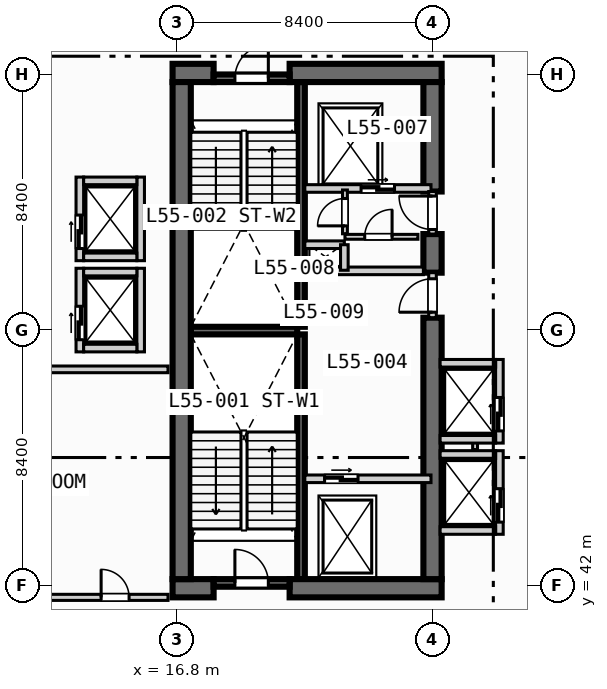
"""IFC4 building model, lengths in metres.
Left out: names, types, materials, properties, quantities, classifications, styles, units other than length and angle.
Written with IfcOpenShell. Run it as: python <this file> out.ifc"""

import sys

from ifc_helpers import new_model, si_unit, direction, frame, frame_2d, origin, place, context, subcontext, project, spatial, rectangle, extrude, element, fill, save


model = new_model("IFC4")
c1 = context("Model", 3, precision=1e-05, world=origin(), true_north=direction((0.0, 1.0)))
c2 = subcontext(c1, "Body", "Model", "MODEL_VIEW")
j1 = project(units=[si_unit("LENGTHUNIT", "METRE"), si_unit("PLANEANGLEUNIT", "RADIAN")], contexts=[c1])
p1 = place(None, origin())
s1 = spatial("IfcSite", under=j1, at=p1, CompositionType="ELEMENT")
p2 = place(p1, origin())
s2 = spatial("IfcBuilding", under=s1, at=p2, CompositionType="ELEMENT")
p3 = place(p2, frame((0.0, 0.0, 224.0)))
s3 = spatial("IfcBuildingStorey", under=s2, at=p3, CompositionType="ELEMENT", Elevation=224.0)
for number, where, z_axis, x_axis in (
    (1, (20.875, 42.2, 0.0), (0.0, 0.0, 1.0), (0.0, 1.0, 0.0)),
    (2, (20.875, 50.5, 0.0), (0.0, 0.0, 1.0), (0.0, 1.0, 0.0)),
):
    element("IfcWall", number, at=place(p3, frame(where, z_axis=z_axis, x_axis=x_axis)), inside=s3, PredefinedType="SOLIDWALL", context=c2, shape_type="SweptSolid", body=[
        extrude(rectangle(XDim=8.05, YDim=0.25, at=frame_2d((4.025, 0.0))), origin(), (0.0, 0.0, 1.0), 3.75),
    ])
p4 = place(p3, frame((17.25, 50.375, 0.0), z_axis=(0.0, 0.0, 1.0), x_axis=(1.0, 0.0, 0.0)))
e3 = element("IfcWall", 3, at=p4, inside=s3, PredefinedType="SOLIDWALL", context=c2, shape_type="SweptSolid", body=[
    extrude(rectangle(XDim=3.5, YDim=0.25, at=frame_2d((1.75, 0.0))), origin(), (0.0, 0.0, 1.0), 3.75),
])
p5 = place(p3, frame((16.65, 41.9, 0.0), z_axis=(0.0, 0.0, 1.0), x_axis=(1.0, 0.0, 0.0)))
e4 = element("IfcWall", 4, at=p5, inside=s3, PredefinedType="SHEAR", context=c2, shape_type="SweptSolid", body=[
    extrude(rectangle(XDim=1.35, YDim=0.6, at=frame_2d((0.675, 0.0))), origin(), (0.0, 0.0, 1.0), 3.75),
])
p6 = place(p3, frame((20.5, 41.9, 0.0), z_axis=(0.0, 0.0, 1.0), x_axis=(1.0, 0.0, 0.0)))
e5 = element("IfcWall", 5, at=p6, inside=s3, PredefinedType="SHEAR", context=c2, shape_type="SweptSolid", body=[
    extrude(rectangle(XDim=5.0, YDim=0.6, at=frame_2d((2.5, 0.0))), origin(), (0.0, 0.0, 1.0), 3.75),
])
p7 = place(p3, frame((16.65, 58.85, 0.0), z_axis=(0.0, 0.0, 1.0), x_axis=(1.0, 0.0, 0.0)))
e6 = element("IfcWall", 6, at=p7, inside=s3, PredefinedType="SHEAR", context=c2, shape_type="SweptSolid", body=[
    extrude(rectangle(XDim=1.35, YDim=0.6, at=frame_2d((0.675, 0.0))), origin(), (0.0, 0.0, 1.0), 3.75),
])
p8 = place(p3, frame((20.5, 58.85, 0.0), z_axis=(0.0, 0.0, 1.0), x_axis=(1.0, 0.0, 0.0)))
e7 = element("IfcWall", 7, at=p8, inside=s3, PredefinedType="SHEAR", context=c2, shape_type="SweptSolid", body=[
    extrude(rectangle(XDim=5.0, YDim=0.6, at=frame_2d((2.5, 0.0))), origin(), (0.0, 0.0, 1.0), 3.75),
])
p9 = place(p3, frame((16.95, 42.2, 0.0), z_axis=(0.0, 0.0, 1.0), x_axis=(0.0, 1.0, 0.0)))
e8 = element("IfcWall", 8, at=p9, inside=s3, PredefinedType="SHEAR", context=c2, shape_type="SweptSolid", body=[
    extrude(rectangle(XDim=16.35, YDim=0.6, at=frame_2d((8.175, 0.0))), origin(), (0.0, 0.0, 1.0), 3.75),
])
p10 = place(p3, frame((25.2, 42.2, 0.0), z_axis=(0.0, 0.0, 1.0), x_axis=(0.0, 1.0, 0.0)))
e9 = element("IfcWall", 9, at=p10, inside=s3, PredefinedType="SHEAR", context=c2, shape_type="SweptSolid", body=[
    extrude(rectangle(XDim=8.6, YDim=0.6, at=frame_2d((4.3, 0.0))), origin(), (0.0, 0.0, 1.0), 3.75),
])
p11 = place(p3, frame((25.2, 52.28, 0.0), z_axis=(0.0, 0.0, 1.0), x_axis=(0.0, 1.0, 0.0)))
e10 = element("IfcWall", 10, at=p11, inside=s3, PredefinedType="SHEAR", context=c2, shape_type="SweptSolid", body=[
    extrude(rectangle(XDim=1.27, YDim=0.6, at=frame_2d((0.635, 0.0))), origin(), (0.0, 0.0, 1.0), 3.75),
])
p12 = place(p3, frame((25.2, 54.95, 0.0), z_axis=(0.0, 0.0, 1.0), x_axis=(0.0, 1.0, 0.0)))
e11 = element("IfcWall", 11, at=p12, inside=s3, PredefinedType="SHEAR", context=c2, shape_type="SweptSolid", body=[
    extrude(rectangle(XDim=3.6, YDim=0.6, at=frame_2d((1.8, 0.0))), origin(), (0.0, 0.0, 1.0), 3.75),
])
p13 = place(p3, frame((18.0, 42.075, 0.0), z_axis=(0.0, 0.0, 1.0), x_axis=(1.0, 0.0, 0.0)))
e12 = element("IfcWall", 12, at=p13, inside=s3, PredefinedType="SOLIDWALL", context=c2, shape_type="SweptSolid", body=[
    extrude(rectangle(XDim=2.5, YDim=0.25, at=frame_2d((1.25, 0.0))), origin(), (0.0, 0.0, 1.0), 3.75),
])
p14 = place(p13, frame((0.7, 0.0, 0.0)))
e13 = element("IfcOpeningElement", 13, at=p14, cuts=e12, PredefinedType="OPENING", context=c2, shape_type="SweptSolid", body=[
    extrude(rectangle(XDim=1.1, YDim=2.15, at=frame_2d((0.55, 1.075))), frame((0.0, 0.135, 0.0), z_axis=(0.0, -1.0, 0.0), x_axis=(1.0, 0.0, 0.0)), (0.0, 0.0, 1.0), 0.27),
])
p15 = place(p3, frame((18.0, 58.675, 0.0), z_axis=(0.0, 0.0, 1.0), x_axis=(1.0, 0.0, 0.0)))
e14 = element("IfcWall", 14, at=p15, inside=s3, PredefinedType="SOLIDWALL", context=c2, shape_type="SweptSolid", body=[
    extrude(rectangle(XDim=2.5, YDim=0.25, at=frame_2d((1.25, 0.0))), origin(), (0.0, 0.0, 1.0), 3.75),
])
p16 = place(p15, frame((0.7, 0.0, 0.0)))
e15 = element("IfcOpeningElement", 15, at=p16, cuts=e14, PredefinedType="OPENING", context=c2, shape_type="SweptSolid", body=[
    extrude(rectangle(XDim=1.1, YDim=2.15, at=frame_2d((0.55, 1.075))), frame((0.0, 0.135, 0.0), z_axis=(0.0, -1.0, 0.0), x_axis=(1.0, 0.0, 0.0)), (0.0, 0.0, 1.0), 0.27),
])
p17 = place(p3, frame((21.0, 45.5, 0.0), z_axis=(0.0, 0.0, 1.0), x_axis=(1.0, 0.0, 0.0)))
e16 = element("IfcWall", 16, at=p17, inside=s3, PredefinedType="SOLIDWALL", context=c2, shape_type="SweptSolid", body=[
    extrude(rectangle(XDim=4.15, YDim=0.25, at=frame_2d((2.075, 0.0))), origin(), (0.0, 0.0, 1.0), 3.75),
])
p18 = place(p17, frame((0.65, 0.0, 0.0)))
e17 = element("IfcOpeningElement", 17, at=p18, cuts=e16, PredefinedType="OPENING", context=c2, shape_type="SweptSolid", body=[
    extrude(rectangle(XDim=1.1, YDim=2.15, at=frame_2d((0.55, 1.075))), frame((0.0, 0.135, 0.0), z_axis=(0.0, -1.0, 0.0), x_axis=(1.0, 0.0, 0.0)), (0.0, 0.0, 1.0), 0.27),
])
p19 = place(p3, frame((25.2, 50.8, 0.0), z_axis=(0.0, 0.0, 1.0), x_axis=(0.0, 1.0, 0.0)))
e18 = element("IfcWall", 18, at=p19, inside=s3, PredefinedType="SOLIDWALL", context=c2, shape_type="SweptSolid", body=[
    extrude(rectangle(XDim=1.48, YDim=0.25, at=frame_2d((0.74, 0.0))), origin(), (0.0, 0.0, 1.0), 3.75),
])
p20 = place(p19, frame((0.18, 0.0, 0.0)))
e19 = element("IfcOpeningElement", 19, at=p20, cuts=e18, PredefinedType="OPENING", context=c2, shape_type="SweptSolid", body=[
    extrude(rectangle(XDim=1.1, YDim=2.15, at=frame_2d((0.55, 1.075))), frame((0.0, 0.135, 0.0), z_axis=(0.0, -1.0, 0.0), x_axis=(1.0, 0.0, 0.0)), (0.0, 0.0, 1.0), 0.27),
])
p21 = place(p3, frame((21.0, 52.34, 0.0), z_axis=(0.0, 0.0, 1.0), x_axis=(1.0, 0.0, 0.0)))
e20 = element("IfcWall", 20, at=p21, inside=s3, PredefinedType="SOLIDWALL", context=c2, shape_type="SweptSolid", body=[
    extrude(rectangle(XDim=3.9, YDim=0.25, at=frame_2d((1.95, 0.0))), origin(), (0.0, 0.0, 1.0), 3.75),
])
p22 = place(p3, frame((21.0, 55.05, 0.0), z_axis=(0.0, 0.0, 1.0), x_axis=(1.0, 0.0, 0.0)))
e21 = element("IfcWall", 21, at=p22, inside=s3, PredefinedType="SOLIDWALL", context=c2, shape_type="SweptSolid", body=[
    extrude(rectangle(XDim=4.15, YDim=0.25, at=frame_2d((2.075, 0.0))), origin(), (0.0, 0.0, 1.0), 3.75),
])
p23 = place(p22, frame((1.85, 0.0, 0.0)))
e22 = element("IfcOpeningElement", 22, at=p23, cuts=e21, PredefinedType="OPENING", context=c2, shape_type="SweptSolid", body=[
    extrude(rectangle(XDim=1.1, YDim=2.15, at=frame_2d((0.55, 1.075))), frame((0.0, 0.135, 0.0), z_axis=(0.0, -1.0, 0.0), x_axis=(1.0, 0.0, 0.0)), (0.0, 0.0, 1.0), 0.27),
])
p24 = place(p3, frame((25.2, 53.55, 0.0), z_axis=(0.0, 0.0, 1.0), x_axis=(0.0, 1.0, 0.0)))
e23 = element("IfcWall", 23, at=p24, inside=s3, PredefinedType="SOLIDWALL", context=c2, shape_type="SweptSolid", body=[
    extrude(rectangle(XDim=1.4, YDim=0.25, at=frame_2d((0.7, 0.0))), origin(), (0.0, 0.0, 1.0), 3.75),
])
p25 = place(p24, frame((0.15, 0.0, 0.0)))
e24 = element("IfcOpeningElement", 24, at=p25, cuts=e23, PredefinedType="OPENING", context=c2, shape_type="SweptSolid", body=[
    extrude(rectangle(XDim=1.1, YDim=2.15, at=frame_2d((0.55, 1.075))), frame((0.0, 0.135, 0.0), z_axis=(0.0, -1.0, 0.0), x_axis=(1.0, 0.0, 0.0)), (0.0, 0.0, 1.0), 0.27),
])
p26 = place(p3, frame((21.0, 53.2, 0.0), z_axis=(0.0, 0.0, 1.0), x_axis=(1.0, 0.0, 0.0)))
e25 = element("IfcWall", 25, at=p26, inside=s3, PredefinedType="SOLIDWALL", context=c2, shape_type="SweptSolid", body=[
    extrude(rectangle(XDim=1.3, YDim=0.25, at=frame_2d((0.65, 0.0))), origin(), (0.0, 0.0, 1.0), 3.75),
])
p27 = place(p3, frame((22.3, 52.36, 0.0), z_axis=(0.0, 0.0, 1.0), x_axis=(0.0, 1.0, 0.0)))
e26 = element("IfcWall", 26, at=p27, inside=s3, PredefinedType="SOLIDWALL", context=c2, shape_type="SweptSolid", body=[
    extrude(rectangle(XDim=0.84, YDim=0.25, at=frame_2d((0.42, 0.0))), origin(), (0.0, 0.0, 1.0), 3.75),
])
p28 = place(p3, frame((22.32, 53.56, 0.0), z_axis=(0.0, 0.0, 1.0), x_axis=(0.0, 1.0, 0.0)))
e27 = element("IfcWall", 27, at=p28, inside=s3, PredefinedType="PARTITIONING", context=c2, shape_type="SweptSolid", body=[
    extrude(rectangle(XDim=1.44, YDim=0.16, at=frame_2d((0.72, 0.0))), origin(), (0.0, 0.0, 1.0), 3.75),
])
p29 = place(p28, frame((0.26, 0.0, 0.0)))
e28 = element("IfcOpeningElement", 28, at=p29, cuts=e27, PredefinedType="OPENING", context=c2, shape_type="SweptSolid", body=[
    extrude(rectangle(XDim=0.9, YDim=2.1, at=frame_2d((0.45, 1.05))), frame((0.0, 0.09, 0.0), z_axis=(0.0, -1.0, 0.0), x_axis=(1.0, 0.0, 0.0)), (0.0, 0.0, 1.0), 0.18),
])
p30 = place(p3, frame((22.32, 53.46, 0.0), z_axis=(0.0, 0.0, 1.0), x_axis=(1.0, 0.0, 0.0)))
e29 = element("IfcWall", 29, at=p30, inside=s3, PredefinedType="PARTITIONING", context=c2, shape_type="SweptSolid", body=[
    extrude(rectangle(XDim=2.4, YDim=0.16, at=frame_2d((1.2, 0.0))), origin(), (0.0, 0.0, 1.0), 3.75),
])
p31 = place(p30, frame((0.65, 0.0, 0.0)))
e30 = element("IfcOpeningElement", 30, at=p31, cuts=e29, PredefinedType="OPENING", context=c2, shape_type="SweptSolid", body=[
    extrude(rectangle(XDim=0.9, YDim=2.1, at=frame_2d((0.45, 1.05))), frame((0.0, 0.09, 0.0), z_axis=(0.0, -1.0, 0.0), x_axis=(1.0, 0.0, 0.0)), (0.0, 0.0, 1.0), 0.18),
])
p32 = place(p3, frame((13.6, 49.675, 0.0), z_axis=(0.0, 0.0, 1.0), x_axis=(0.0, 1.0, 0.0)))
e31 = element("IfcWall", 31, at=p32, inside=s3, PredefinedType="SOLIDWALL", context=c2, shape_type="SweptSolid", body=[
    extrude(rectangle(XDim=2.75, YDim=0.25, at=frame_2d((1.375, 0.0))), origin(), (0.0, 0.0, 1.0), 3.75),
])
p33 = place(p32, frame((0.4, 0.0, 0.0)))
e32 = element("IfcOpeningElement", 32, at=p33, cuts=e31, PredefinedType="OPENING", context=c2, shape_type="SweptSolid", body=[
    extrude(rectangle(XDim=1.1, YDim=2.15, at=frame_2d((0.55, 1.075))), frame((0.0, 0.135, 0.0), z_axis=(0.0, -1.0, 0.0), x_axis=(1.0, 0.0, 0.0)), (0.0, 0.0, 1.0), 0.27),
])
p34 = place(p3, frame((15.6, 49.675, 0.0), z_axis=(0.0, 0.0, 1.0), x_axis=(0.0, 1.0, 0.0)))
e33 = element("IfcWall", 33, at=p34, inside=s3, PredefinedType="SOLIDWALL", context=c2, shape_type="SweptSolid", body=[
    extrude(rectangle(XDim=2.75, YDim=0.25, at=frame_2d((1.375, 0.0))), origin(), (0.0, 0.0, 1.0), 3.75),
])
for number, where, z_axis, x_axis in (
    (34, (13.725, 49.8, 0.0), (0.0, 0.0, 1.0), (1.0, 0.0, 0.0)),
    (35, (13.725, 52.3, 0.0), (0.0, 0.0, 1.0), (1.0, 0.0, 0.0)),
):
    element("IfcWall", number, at=place(p3, frame(where, z_axis=z_axis, x_axis=x_axis)), inside=s3, PredefinedType="SOLIDWALL", context=c2, shape_type="SweptSolid", body=[
        extrude(rectangle(XDim=1.75, YDim=0.25, at=frame_2d((0.875, 0.0))), origin(), (0.0, 0.0, 1.0), 3.75),
    ])
p35 = place(p3, frame((13.6, 52.675, 0.0), z_axis=(0.0, 0.0, 1.0), x_axis=(0.0, 1.0, 0.0)))
e36 = element("IfcWall", 36, at=p35, inside=s3, PredefinedType="SOLIDWALL", context=c2, shape_type="SweptSolid", body=[
    extrude(rectangle(XDim=2.75, YDim=0.25, at=frame_2d((1.375, 0.0))), origin(), (0.0, 0.0, 1.0), 3.75),
])
p36 = place(p35, frame((0.4, 0.0, 0.0)))
e37 = element("IfcOpeningElement", 37, at=p36, cuts=e36, PredefinedType="OPENING", context=c2, shape_type="SweptSolid", body=[
    extrude(rectangle(XDim=1.1, YDim=2.15, at=frame_2d((0.55, 1.075))), frame((0.0, 0.135, 0.0), z_axis=(0.0, -1.0, 0.0), x_axis=(1.0, 0.0, 0.0)), (0.0, 0.0, 1.0), 0.27),
])
p37 = place(p3, frame((15.6, 52.675, 0.0), z_axis=(0.0, 0.0, 1.0), x_axis=(0.0, 1.0, 0.0)))
e38 = element("IfcWall", 38, at=p37, inside=s3, PredefinedType="SOLIDWALL", context=c2, shape_type="SweptSolid", body=[
    extrude(rectangle(XDim=2.75, YDim=0.25, at=frame_2d((1.375, 0.0))), origin(), (0.0, 0.0, 1.0), 3.75),
])
for number, where, z_axis, x_axis in (
    (39, (13.725, 52.8, 0.0), (0.0, 0.0, 1.0), (1.0, 0.0, 0.0)),
    (40, (13.725, 55.3, 0.0), (0.0, 0.0, 1.0), (1.0, 0.0, 0.0)),
):
    element("IfcWall", number, at=place(p3, frame(where, z_axis=z_axis, x_axis=x_axis)), inside=s3, PredefinedType="SOLIDWALL", context=c2, shape_type="SweptSolid", body=[
        extrude(rectangle(XDim=1.75, YDim=0.25, at=frame_2d((0.875, 0.0))), origin(), (0.0, 0.0, 1.0), 3.75),
    ])
p38 = place(p3, frame((27.4, 43.675, 0.0), z_axis=(0.0, 0.0, 1.0), x_axis=(0.0, 1.0, 0.0)))
e41 = element("IfcWall", 41, at=p38, inside=s3, PredefinedType="SOLIDWALL", context=c2, shape_type="SweptSolid", body=[
    extrude(rectangle(XDim=2.75, YDim=0.25, at=frame_2d((1.375, 0.0))), origin(), (0.0, 0.0, 1.0), 3.75),
])
p39 = place(p38, frame((0.4, 0.0, 0.0)))
e42 = element("IfcOpeningElement", 42, at=p39, cuts=e41, PredefinedType="OPENING", context=c2, shape_type="SweptSolid", body=[
    extrude(rectangle(XDim=1.1, YDim=2.15, at=frame_2d((0.55, 1.075))), frame((0.0, 0.135, 0.0), z_axis=(0.0, -1.0, 0.0), x_axis=(1.0, 0.0, 0.0)), (0.0, 0.0, 1.0), 0.27),
])
for number, where, z_axis, x_axis in (
    (43, (25.45, 43.8, 0.0), (0.0, 0.0, 1.0), (1.0, 0.0, 0.0)),
    (44, (25.45, 46.3, 0.0), (0.0, 0.0, 1.0), (1.0, 0.0, 0.0)),
):
    element("IfcWall", number, at=place(p3, frame(where, z_axis=z_axis, x_axis=x_axis)), inside=s3, PredefinedType="SOLIDWALL", context=c2, shape_type="SweptSolid", body=[
        extrude(rectangle(XDim=1.825, YDim=0.25, at=frame_2d((0.913, 0.0))), origin(), (0.0, 0.0, 1.0), 3.75),
    ])
p40 = place(p3, frame((26.6, 46.46, 0.0), z_axis=(0.0, 0.0, 1.0), x_axis=(0.0, 1.0, 0.0)))
e45 = element("IfcWall", 45, at=p40, inside=s3, PredefinedType="PARTITIONING", context=c2, shape_type="SweptSolid", body=[
    extrude(rectangle(XDim=0.88, YDim=0.16, at=frame_2d((0.44, 0.0))), origin(), (0.0, 0.0, 1.0), 3.75),
])
p41 = place(p3, frame((27.4, 46.675, 0.0), z_axis=(0.0, 0.0, 1.0), x_axis=(0.0, 1.0, 0.0)))
e46 = element("IfcWall", 46, at=p41, inside=s3, PredefinedType="SOLIDWALL", context=c2, shape_type="SweptSolid", body=[
    extrude(rectangle(XDim=2.75, YDim=0.25, at=frame_2d((1.375, 0.0))), origin(), (0.0, 0.0, 1.0), 3.75),
])
p42 = place(p41, frame((0.4, 0.0, 0.0)))
e47 = element("IfcOpeningElement", 47, at=p42, cuts=e46, PredefinedType="OPENING", context=c2, shape_type="SweptSolid", body=[
    extrude(rectangle(XDim=1.1, YDim=2.15, at=frame_2d((0.55, 1.075))), frame((0.0, 0.135, 0.0), z_axis=(0.0, -1.0, 0.0), x_axis=(1.0, 0.0, 0.0)), (0.0, 0.0, 1.0), 0.27),
])
for number, where, z_axis, x_axis in (
    (48, (25.45, 46.8, 0.0), (0.0, 0.0, 1.0), (1.0, 0.0, 0.0)),
    (49, (25.45, 49.3, 0.0), (0.0, 0.0, 1.0), (1.0, 0.0, 0.0)),
):
    element("IfcWall", number, at=place(p3, frame(where, z_axis=z_axis, x_axis=x_axis)), inside=s3, PredefinedType="SOLIDWALL", context=c2, shape_type="SweptSolid", body=[
        extrude(rectangle(XDim=1.825, YDim=0.25, at=frame_2d((0.913, 0.0))), origin(), (0.0, 0.0, 1.0), 3.75),
    ])
p43 = place(p3, frame((0.3, 41.6, 0.0), z_axis=(0.0, 0.0, 1.0), x_axis=(1.0, 0.0, 0.0)))
e50 = element("IfcWall", 50, at=p43, inside=s3, PredefinedType="PARTITIONING", context=c2, shape_type="SweptSolid", body=[
    extrude(rectangle(XDim=16.2, YDim=0.2, at=frame_2d((8.1, 0.0))), origin(), (0.0, 0.0, 1.0), 3.75),
])
p44 = place(p43, frame((14.0, 0.0, 0.0)))
e51 = element("IfcOpeningElement", 51, at=p44, cuts=e50, PredefinedType="OPENING", context=c2, shape_type="SweptSolid", body=[
    extrude(rectangle(XDim=0.92, YDim=2.1, at=frame_2d((0.46, 1.05))), frame((0.0, 0.11, 0.0), z_axis=(0.0, -1.0, 0.0), x_axis=(1.0, 0.0, 0.0)), (0.0, 0.0, 1.0), 0.22),
])
p45 = place(p3, frame((0.3, 49.1, 0.0), z_axis=(0.0, 0.0, 1.0), x_axis=(1.0, 0.0, 0.0)))
e52 = element("IfcWall", 52, at=p45, inside=s3, PredefinedType="PARTITIONING", context=c2, shape_type="SweptSolid", body=[
    extrude(rectangle(XDim=16.2, YDim=0.22, at=frame_2d((8.1, 0.0))), origin(), (0.0, 0.0, 1.0), 3.75),
])
p46 = place(p14, origin())
e53 = element("IfcDoor", 53, at=p46, inside=s3, OperationType="SINGLE_SWING_LEFT", PredefinedType="DOOR", context=c2, shape_type="SweptSolid", body=[
    extrude(rectangle(XDim=1.1, YDim=2.15, at=frame_2d((0.55, 1.075))), frame((0.0, 0.025, 0.0), z_axis=(0.0, -1.0, 0.0), x_axis=(1.0, 0.0, 0.0)), (0.0, 0.0, 1.0), 0.05),
])
fill(e13, e53)
p47 = place(p16, origin())
e54 = element("IfcDoor", 54, at=p47, inside=s3, OperationType="SINGLE_SWING_RIGHT", PredefinedType="DOOR", context=c2, shape_type="SweptSolid", body=[
    extrude(rectangle(XDim=1.1, YDim=2.15, at=frame_2d((0.55, 1.075))), frame((0.0, 0.025, 0.0), z_axis=(0.0, -1.0, 0.0), x_axis=(1.0, 0.0, 0.0)), (0.0, 0.0, 1.0), 0.05),
])
fill(e15, e54)
p48 = place(p18, origin())
e55 = element("IfcDoor", 55, at=p48, inside=s3, OperationType="SLIDING_TO_LEFT", PredefinedType="DOOR", context=c2, shape_type="SweptSolid", body=[
    extrude(rectangle(XDim=1.1, YDim=2.15, at=frame_2d((0.55, 1.075))), frame((0.0, 0.025, 0.0), z_axis=(0.0, -1.0, 0.0), x_axis=(1.0, 0.0, 0.0)), (0.0, 0.0, 1.0), 0.05),
])
fill(e17, e55)
p49 = place(p20, origin())
e56 = element("IfcDoor", 56, at=p49, inside=s3, OperationType="SINGLE_SWING_LEFT", PredefinedType="DOOR", context=c2, shape_type="SweptSolid", body=[
    extrude(rectangle(XDim=1.1, YDim=2.15, at=frame_2d((0.55, 1.075))), frame((0.0, 0.025, 0.0), z_axis=(0.0, -1.0, 0.0), x_axis=(1.0, 0.0, 0.0)), (0.0, 0.0, 1.0), 0.05),
])
fill(e19, e56)
p50 = place(p23, origin())
e57 = element("IfcDoor", 57, at=p50, inside=s3, OperationType="SLIDING_TO_LEFT", PredefinedType="DOOR", context=c2, shape_type="SweptSolid", body=[
    extrude(rectangle(XDim=1.1, YDim=2.15, at=frame_2d((0.55, 1.075))), frame((0.0, 0.025, 0.0), z_axis=(0.0, -1.0, 0.0), x_axis=(1.0, 0.0, 0.0)), (0.0, 0.0, 1.0), 0.05),
])
fill(e22, e57)
p51 = place(p25, origin())
e58 = element("IfcDoor", 58, at=p51, inside=s3, OperationType="SINGLE_SWING_RIGHT", PredefinedType="DOOR", context=c2, shape_type="SweptSolid", body=[
    extrude(rectangle(XDim=1.1, YDim=2.15, at=frame_2d((0.55, 1.075))), frame((0.0, 0.025, 0.0), z_axis=(0.0, -1.0, 0.0), x_axis=(1.0, 0.0, 0.0)), (0.0, 0.0, 1.0), 0.05),
])
fill(e24, e58)
p52 = place(p29, origin())
e59 = element("IfcDoor", 59, at=p52, inside=s3, OperationType="SINGLE_SWING_LEFT", PredefinedType="DOOR", context=c2, shape_type="SweptSolid", body=[
    extrude(rectangle(XDim=0.9, YDim=2.1, at=frame_2d((0.45, 1.05))), frame((0.0, 0.025, 0.0), z_axis=(0.0, -1.0, 0.0), x_axis=(1.0, 0.0, 0.0)), (0.0, 0.0, 1.0), 0.05),
])
fill(e28, e59)
p53 = place(p31, origin())
e60 = element("IfcDoor", 60, at=p53, inside=s3, OperationType="SINGLE_SWING_RIGHT", PredefinedType="DOOR", context=c2, shape_type="SweptSolid", body=[
    extrude(rectangle(XDim=0.9, YDim=2.1, at=frame_2d((0.45, 1.05))), frame((0.0, 0.025, 0.0), z_axis=(0.0, -1.0, 0.0), x_axis=(1.0, 0.0, 0.0)), (0.0, 0.0, 1.0), 0.05),
])
fill(e30, e60)
p54 = place(p33, origin())
e61 = element("IfcDoor", 61, at=p54, inside=s3, OperationType="SLIDING_TO_LEFT", PredefinedType="DOOR", context=c2, shape_type="SweptSolid", body=[
    extrude(rectangle(XDim=1.1, YDim=2.15, at=frame_2d((0.55, 1.075))), frame((0.0, 0.025, 0.0), z_axis=(0.0, -1.0, 0.0), x_axis=(1.0, 0.0, 0.0)), (0.0, 0.0, 1.0), 0.05),
])
fill(e32, e61)
p55 = place(p36, origin())
e62 = element("IfcDoor", 62, at=p55, inside=s3, OperationType="SLIDING_TO_LEFT", PredefinedType="DOOR", context=c2, shape_type="SweptSolid", body=[
    extrude(rectangle(XDim=1.1, YDim=2.15, at=frame_2d((0.55, 1.075))), frame((0.0, 0.025, 0.0), z_axis=(0.0, -1.0, 0.0), x_axis=(1.0, 0.0, 0.0)), (0.0, 0.0, 1.0), 0.05),
])
fill(e37, e62)
p56 = place(p39, origin())
e63 = element("IfcDoor", 63, at=p56, inside=s3, OperationType="SLIDING_TO_LEFT", PredefinedType="DOOR", context=c2, shape_type="SweptSolid", body=[
    extrude(rectangle(XDim=1.1, YDim=2.15, at=frame_2d((0.55, 1.075))), frame((0.0, 0.025, 0.0), z_axis=(0.0, -1.0, 0.0), x_axis=(1.0, 0.0, 0.0)), (0.0, 0.0, 1.0), 0.05),
])
fill(e42, e63)
p57 = place(p42, origin())
e64 = element("IfcDoor", 64, at=p57, inside=s3, OperationType="SLIDING_TO_LEFT", PredefinedType="DOOR", context=c2, shape_type="SweptSolid", body=[
    extrude(rectangle(XDim=1.1, YDim=2.15, at=frame_2d((0.55, 1.075))), frame((0.0, 0.025, 0.0), z_axis=(0.0, -1.0, 0.0), x_axis=(1.0, 0.0, 0.0)), (0.0, 0.0, 1.0), 0.05),
])
fill(e47, e64)
p58 = place(p44, origin())
e65 = element("IfcDoor", 65, at=p58, inside=s3, OperationType="SINGLE_SWING_LEFT", PredefinedType="DOOR", context=c2, shape_type="SweptSolid", body=[
    extrude(rectangle(XDim=0.92, YDim=2.1, at=frame_2d((0.46, 1.05))), frame((0.0, 0.025, 0.0), z_axis=(0.0, -1.0, 0.0), x_axis=(1.0, 0.0, 0.0)), (0.0, 0.0, 1.0), 0.05),
])
fill(e51, e65)
save(model, sys.argv[1])
